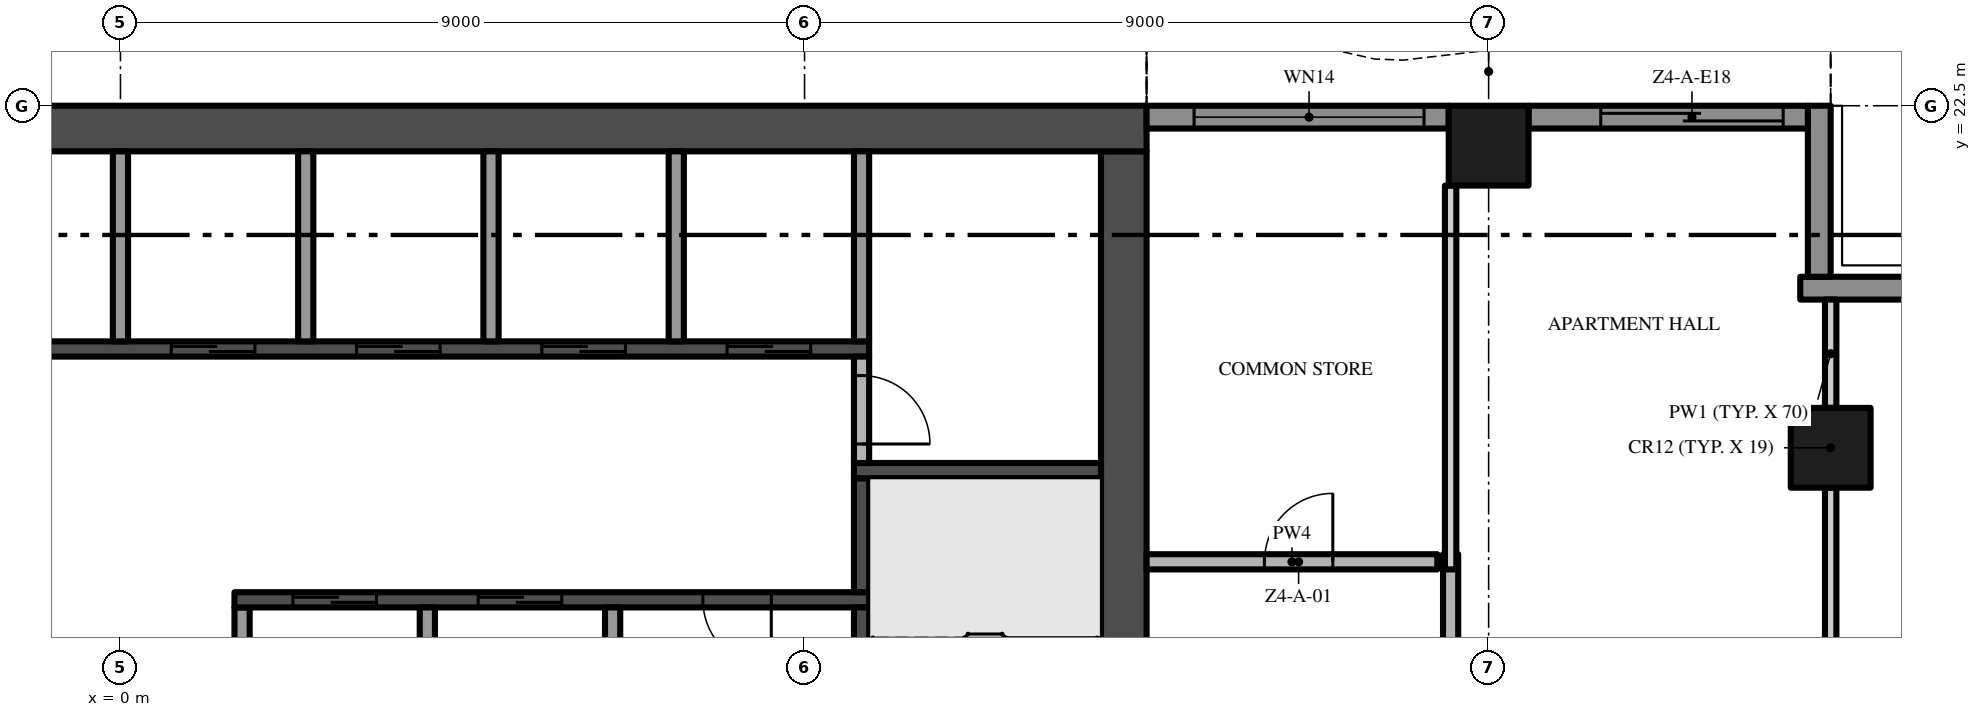
"""IFC4 building model, lengths in metres.
Left out: names, types, materials, properties, quantities, classifications, styles, units other than length and angle.
Written with IfcOpenShell. Run it as: python <this file> out.ifc"""

import sys

from ifc_helpers import new_model, si_unit, direction, frame, frame_2d, origin, origin_2d, place, context, subcontext, project, spatial, polyline, rectangle, outline, extrude, element, fill, save


model = new_model("IFC4")
c1 = context("Model", 3, precision=1e-05, world=origin(), true_north=direction((0.0, 1.0)))
c2 = subcontext(c1, "Body", "Model", "MODEL_VIEW")
j1 = project(units=[si_unit("LENGTHUNIT", "METRE"), si_unit("PLANEANGLEUNIT", "RADIAN")], contexts=[c1])
p1 = place(None, origin())
s1 = spatial("IfcSite", under=j1, at=p1, CompositionType="ELEMENT")
p2 = place(p1, origin())
s2 = spatial("IfcBuilding", under=s1, at=p2, CompositionType="ELEMENT")
p3 = place(p2, frame((0.0, 0.0, 192.0)))
s3 = spatial("IfcBuildingStorey", under=s2, at=p3, CompositionType="ELEMENT", Elevation=192.0)
p4 = place(p3, frame((13.2, 5.1, -0.3), z_axis=(0.0, 0.0, 1.0), x_axis=(0.0, 1.0, 0.0)))
e1 = element("IfcWall", 1, at=p4, inside=s3, PredefinedType="SHEAR", context=c2, shape_type="SweptSolid", body=[
    extrude(rectangle(XDim=16.8, YDim=0.6, at=frame_2d((8.4, 0.0))), origin(), (0.0, 0.0, 1.0), 3.8),
])
p5 = place(p4, frame((6.3, 0.0, 0.3)))
e2 = element("IfcOpeningElement", 2, at=p5, cuts=e1, PredefinedType="OPENING", context=c2, shape_type="SweptSolid", body=[
    extrude(rectangle(XDim=1.2, YDim=2.2, at=frame_2d((0.6, 1.1))), frame((0.0, 0.31, 0.0), z_axis=(0.0, -1.0, 0.0), x_axis=(1.0, 0.0, 0.0)), (0.0, 0.0, 1.0), 0.62),
])
p6 = place(p3, frame((13.5, 22.2, -0.3), z_axis=(0.0, 0.0, 1.0), x_axis=(-1.0, 0.0, 0.0)))
e3 = element("IfcWall", 3, at=p6, inside=s3, PredefinedType="SHEAR", context=c2, shape_type="SweptSolid", body=[
    extrude(rectangle(XDim=27.0, YDim=0.6, at=frame_2d((13.5, 0.0))), origin(), (0.0, 0.0, 1.0), 3.8),
])
for number, where, z_axis, x_axis in (
    (4, (18.0, 21.975, 0.0), (0.0, 0.0, 1.0), (1.0, 0.0, 0.0)),
    (5, (22.5, 18.0, 0.0), (0.0, 0.0, 1.0), (1.0, 0.0, 0.0)),
):
    element("IfcColumn", number, at=place(p3, frame(where, z_axis=z_axis, x_axis=x_axis)), inside=s3, PredefinedType="COLUMN", context=c2, shape_type="SweptSolid", body=[
        extrude(rectangle(XDim=1.05, YDim=1.05, at=origin_2d()), origin(), (0.0, 0.0, 1.0), 3.5),
    ])
p7 = place(p3, frame((22.1, 20.1, 0.0), z_axis=(0.0, 0.0, 1.0), x_axis=(1.0, 0.0, 0.0)))
e6 = element("IfcWall", 6, at=p7, inside=s3, PredefinedType="SOLIDWALL", context=c2, shape_type="SweptSolid", body=[
    extrude(rectangle(XDim=2.35, YDim=0.3, at=frame_2d((1.175, 0.0))), origin(), (0.0, 0.0, 1.0), 3.5),
])
p8 = place(p3, frame((22.35, 22.5, 0.0), z_axis=(0.0, 0.0, 1.0), x_axis=(0.0, -1.0, 0.0)))
e7 = element("IfcWall", 7, at=p8, inside=s3, PredefinedType="SOLIDWALL", context=c2, shape_type="SweptSolid", body=[
    extrude(rectangle(XDim=2.25, YDim=0.3, at=frame_2d((1.125, 0.0))), origin(), (0.0, 0.0, 1.0), 3.5),
])
p9 = place(p3, frame((18.525, 22.35, 0.0), z_axis=(0.0, 0.0, 1.0), x_axis=(1.0, 0.0, 0.0)))
e8 = element("IfcWall", 8, at=p9, inside=s3, PredefinedType="SOLIDWALL", context=c2, shape_type="SweptSolid", body=[
    extrude(rectangle(XDim=3.675, YDim=0.3, at=frame_2d((1.837, 0.0))), origin(), (0.0, 0.0, 1.0), 3.5),
])
p10 = place(p9, frame((0.95, 0.0, 0.0)))
e9 = element("IfcOpeningElement", 9, at=p10, cuts=e8, PredefinedType="OPENING", context=c2, shape_type="SweptSolid", body=[
    extrude(rectangle(XDim=2.4, YDim=2.4, at=frame_2d((1.2, 1.2))), frame((0.0, 0.16, 0.0), z_axis=(0.0, -1.0, 0.0), x_axis=(1.0, 0.0, 0.0)), (0.0, 0.0, 1.0), 0.32),
])
p11 = place(p3, frame((13.5, 22.35, 0.0), z_axis=(0.0, 0.0, 1.0), x_axis=(1.0, 0.0, 0.0)))
e10 = element("IfcWall", 10, at=p11, inside=s3, PredefinedType="SOLIDWALL", context=c2, shape_type="SweptSolid", body=[
    extrude(rectangle(XDim=3.975, YDim=0.3, at=frame_2d((1.988, 0.0))), origin(), (0.0, 0.0, 1.0), 3.5),
])
p12 = place(p11, frame((0.625, 0.0, 0.45)))
e11 = element("IfcOpeningElement", 11, at=p12, cuts=e10, PredefinedType="OPENING", context=c2, shape_type="SweptSolid", body=[
    extrude(rectangle(XDim=3.025, YDim=2.65, at=frame_2d((1.512, 1.325))), frame((0.0, 0.16, 0.0), z_axis=(0.0, -1.0, 0.0), x_axis=(1.0, 0.0, 0.0)), (0.0, 0.0, 1.0), 0.32),
])
p13 = place(p3, origin())
e12 = element("IfcWall", 12, at=p13, inside=s3, PredefinedType="USERDEFINED", context=c2, shape_type="SweptSolid", body=[
    extrude(outline(polyline([(22.5, 25.149), (21.0, 24.488), (19.5, 23.755), (18.0, 23.231), (16.875, 23.1), (16.5, 23.115), (15.0, 23.451), (13.5, 24.112), (13.399, 23.883), (14.921, 23.213), (16.467, 22.866), (16.885, 22.849), (18.056, 22.986), (19.596, 23.524), (21.105, 24.261), (22.601, 24.92), (22.5, 25.149)])), origin(), (0.0, 0.0, 1.0), 0.9),
])
p14 = place(p3, frame((-9.85, 19.3, 0.0), z_axis=(0.0, 0.0, 1.0), x_axis=(1.0, 0.0, 0.0)))
e13 = element("IfcWall", 13, at=p14, inside=s3, PredefinedType="SHEAR", context=c2, shape_type="SweptSolid", body=[
    extrude(rectangle(XDim=19.7, YDim=0.2, at=frame_2d((9.85, 0.0))), origin(), (0.0, 0.0, 1.0), 3.5),
])
p15 = place(p14, frame((10.519, 0.0, 0.0)))
e14 = element("IfcOpeningElement", 14, at=p15, cuts=e13, PredefinedType="OPENING", context=c2, shape_type="SweptSolid", body=[
    extrude(rectangle(XDim=1.1, YDim=2.1, at=frame_2d((0.55, 1.05))), frame((0.0, 0.11, 0.0), z_axis=(0.0, -1.0, 0.0), x_axis=(1.0, 0.0, 0.0)), (0.0, 0.0, 1.0), 0.22),
])
p16 = place(p14, frame((12.956, 0.0, 0.0)))
e15 = element("IfcOpeningElement", 15, at=p16, cuts=e13, PredefinedType="OPENING", context=c2, shape_type="SweptSolid", body=[
    extrude(rectangle(XDim=1.1, YDim=2.1, at=frame_2d((0.55, 1.05))), frame((0.0, 0.11, 0.0), z_axis=(0.0, -1.0, 0.0), x_axis=(1.0, 0.0, 0.0)), (0.0, 0.0, 1.0), 0.22),
])
p17 = place(p14, frame((15.394, 0.0, 0.0)))
e16 = element("IfcOpeningElement", 16, at=p17, cuts=e13, PredefinedType="OPENING", context=c2, shape_type="SweptSolid", body=[
    extrude(rectangle(XDim=1.1, YDim=2.1, at=frame_2d((0.55, 1.05))), frame((0.0, 0.11, 0.0), z_axis=(0.0, -1.0, 0.0), x_axis=(1.0, 0.0, 0.0)), (0.0, 0.0, 1.0), 0.22),
])
p18 = place(p14, frame((17.831, 0.0, 0.0)))
e17 = element("IfcOpeningElement", 17, at=p18, cuts=e13, PredefinedType="OPENING", context=c2, shape_type="SweptSolid", body=[
    extrude(rectangle(XDim=1.1, YDim=2.1, at=frame_2d((0.55, 1.05))), frame((0.0, 0.11, 0.0), z_axis=(0.0, -1.0, 0.0), x_axis=(1.0, 0.0, 0.0)), (0.0, 0.0, 1.0), 0.22),
])
p19 = place(p14, frame((2.087, 0.0, 0.0)))
e18 = element("IfcOpeningElement", 18, at=p19, cuts=e13, PredefinedType="OPENING", context=c2, shape_type="SweptSolid", body=[
    extrude(rectangle(XDim=0.9, YDim=2.1, at=frame_2d((0.45, 1.05))), frame((0.0, 0.11, 0.0), z_axis=(0.0, -1.0, 0.0), x_axis=(1.0, 0.0, 0.0)), (0.0, 0.0, 1.0), 0.22),
])
p20 = place(p14, frame((6.963, 0.0, 0.0)))
e19 = element("IfcOpeningElement", 19, at=p20, cuts=e13, PredefinedType="OPENING", context=c2, shape_type="SweptSolid", body=[
    extrude(rectangle(XDim=0.9, YDim=2.1, at=frame_2d((0.45, 1.05))), frame((0.0, 0.11, 0.0), z_axis=(0.0, -1.0, 0.0), x_axis=(1.0, 0.0, 0.0)), (0.0, 0.0, 1.0), 0.22),
])
p21 = place(p3, frame((0.0, 19.4, 0.0), z_axis=(0.0, 0.0, 1.0), x_axis=(0.0, 1.0, 0.0)))
e20 = element("IfcWall", 20, at=p21, inside=s3, PredefinedType="PARTITIONING", context=c2, shape_type="SweptSolid", body=[
    extrude(rectangle(XDim=2.5, YDim=0.2, at=frame_2d((1.25, 0.0))), origin(), (0.0, 0.0, 1.0), 3.5),
])
p22 = place(p3, frame((1.6, 13.7, 0.0), z_axis=(0.0, 0.0, 1.0), x_axis=(0.0, 1.0, 0.0)))
e21 = element("IfcWall", 21, at=p22, inside=s3, PredefinedType="PARTITIONING", context=c2, shape_type="SweptSolid", body=[
    extrude(rectangle(XDim=2.2, YDim=0.2, at=frame_2d((1.1, 0.0))), origin(), (0.0, 0.0, 1.0), 3.5),
])
p23 = place(p3, frame((9.85, 16.0, 0.0), z_axis=(0.0, 0.0, 1.0), x_axis=(-1.0, 0.0, 0.0)))
e22 = element("IfcWall", 22, at=p23, inside=s3, PredefinedType="SHEAR", context=c2, shape_type="SweptSolid", body=[
    extrude(rectangle(XDim=8.35, YDim=0.2, at=frame_2d((4.175, 0.0))), origin(), (0.0, 0.0, 1.0), 3.5),
])
p24 = place(p23, frame((6.481, 0.0, 0.0)))
e23 = element("IfcOpeningElement", 23, at=p24, cuts=e22, PredefinedType="OPENING", context=c2, shape_type="SweptSolid", body=[
    extrude(rectangle(XDim=1.1, YDim=2.1, at=frame_2d((0.55, 1.05))), frame((0.0, 0.11, 0.0), z_axis=(0.0, -1.0, 0.0), x_axis=(1.0, 0.0, 0.0)), (0.0, 0.0, 1.0), 0.22),
])
p25 = place(p23, frame((4.044, 0.0, 0.0)))
e24 = element("IfcOpeningElement", 24, at=p25, cuts=e22, PredefinedType="OPENING", context=c2, shape_type="SweptSolid", body=[
    extrude(rectangle(XDim=1.1, YDim=2.1, at=frame_2d((0.55, 1.05))), frame((0.0, 0.11, 0.0), z_axis=(0.0, -1.0, 0.0), x_axis=(1.0, 0.0, 0.0)), (0.0, 0.0, 1.0), 0.22),
])
p26 = place(p23, frame((1.288, 0.0, 0.0)))
e25 = element("IfcOpeningElement", 25, at=p26, cuts=e22, PredefinedType="OPENING", context=c2, shape_type="SweptSolid", body=[
    extrude(rectangle(XDim=0.9, YDim=2.1, at=frame_2d((0.45, 1.05))), frame((0.0, 0.11, 0.0), z_axis=(0.0, -1.0, 0.0), x_axis=(1.0, 0.0, 0.0)), (0.0, 0.0, 1.0), 0.22),
])
p27 = place(p3, frame((2.438, 19.4, 0.0), z_axis=(0.0, 0.0, 1.0), x_axis=(0.0, 1.0, 0.0)))
e26 = element("IfcWall", 26, at=p27, inside=s3, PredefinedType="PARTITIONING", context=c2, shape_type="SweptSolid", body=[
    extrude(rectangle(XDim=2.5, YDim=0.2, at=frame_2d((1.25, 0.0))), origin(), (0.0, 0.0, 1.0), 3.5),
])
p28 = place(p3, frame((4.037, 13.7, 0.0), z_axis=(0.0, 0.0, 1.0), x_axis=(0.0, 1.0, 0.0)))
e27 = element("IfcWall", 27, at=p28, inside=s3, PredefinedType="PARTITIONING", context=c2, shape_type="SweptSolid", body=[
    extrude(rectangle(XDim=2.2, YDim=0.2, at=frame_2d((1.1, 0.0))), origin(), (0.0, 0.0, 1.0), 3.5),
])
p29 = place(p3, frame((4.875, 19.4, 0.0), z_axis=(0.0, 0.0, 1.0), x_axis=(0.0, 1.0, 0.0)))
e28 = element("IfcWall", 28, at=p29, inside=s3, PredefinedType="PARTITIONING", context=c2, shape_type="SweptSolid", body=[
    extrude(rectangle(XDim=2.5, YDim=0.2, at=frame_2d((1.25, 0.0))), origin(), (0.0, 0.0, 1.0), 3.5),
])
p30 = place(p3, frame((6.475, 13.7, 0.0), z_axis=(0.0, 0.0, 1.0), x_axis=(0.0, 1.0, 0.0)))
e29 = element("IfcWall", 29, at=p30, inside=s3, PredefinedType="PARTITIONING", context=c2, shape_type="SweptSolid", body=[
    extrude(rectangle(XDim=2.2, YDim=0.2, at=frame_2d((1.1, 0.0))), origin(), (0.0, 0.0, 1.0), 3.5),
])
p31 = place(p3, frame((7.312, 19.4, 0.0), z_axis=(0.0, 0.0, 1.0), x_axis=(0.0, 1.0, 0.0)))
e30 = element("IfcWall", 30, at=p31, inside=s3, PredefinedType="PARTITIONING", context=c2, shape_type="SweptSolid", body=[
    extrude(rectangle(XDim=2.5, YDim=0.2, at=frame_2d((1.25, 0.0))), origin(), (0.0, 0.0, 1.0), 3.5),
])
p32 = place(p3, frame((9.75, 12.3, 0.0), z_axis=(0.0, 0.0, 1.0), x_axis=(0.0, 1.0, 0.0)))
e31 = element("IfcWall", 31, at=p32, inside=s3, PredefinedType="SHEAR", context=c2, shape_type="SweptSolid", body=[
    extrude(rectangle(XDim=3.6, YDim=0.2, at=frame_2d((1.8, 0.0))), origin(), (0.0, 0.0, 1.0), 3.5),
])
p33 = place(p3, frame((9.75, 16.1, 0.0), z_axis=(0.0, 0.0, 1.0), x_axis=(0.0, 1.0, 0.0)))
e32 = element("IfcWall", 32, at=p33, inside=s3, PredefinedType="SHEAR", context=c2, shape_type="SweptSolid", body=[
    extrude(rectangle(XDim=1.5, YDim=0.2, at=frame_2d((0.75, 0.0))), origin(), (0.0, 0.0, 1.0), 3.5),
])
p34 = place(p3, frame((9.65, 17.7, 0.0), z_axis=(0.0, 0.0, 1.0), x_axis=(1.0, 0.0, 0.0)))
e33 = element("IfcWall", 33, at=p34, inside=s3, PredefinedType="SHEAR", context=c2, shape_type="SweptSolid", body=[
    extrude(rectangle(XDim=3.25, YDim=0.2, at=frame_2d((1.625, 0.0))), origin(), (0.0, 0.0, 1.0), 3.5),
])
p35 = place(p3, frame((9.75, 19.2, 0.0), z_axis=(0.0, 0.0, 1.0), x_axis=(0.0, -1.0, 0.0)))
e34 = element("IfcWall", 34, at=p35, inside=s3, PredefinedType="PARTITIONING", context=c2, shape_type="SweptSolid", body=[
    extrude(rectangle(XDim=1.4, YDim=0.2, at=frame_2d((0.7, 0.0))), origin(), (0.0, 0.0, 1.0), 3.5),
])
p36 = place(p35, frame((0.25, 0.0, 0.0)))
e35 = element("IfcOpeningElement", 35, at=p36, cuts=e34, PredefinedType="OPENING", context=c2, shape_type="SweptSolid", body=[
    extrude(rectangle(XDim=0.9, YDim=2.1, at=frame_2d((0.45, 1.05))), frame((0.0, 0.11, 0.0), z_axis=(0.0, -1.0, 0.0), x_axis=(1.0, 0.0, 0.0)), (0.0, 0.0, 1.0), 0.22),
])
p37 = place(p3, frame((9.75, 19.4, 0.0), z_axis=(0.0, 0.0, 1.0), x_axis=(0.0, 1.0, 0.0)))
e36 = element("IfcWall", 36, at=p37, inside=s3, PredefinedType="PARTITIONING", context=c2, shape_type="SweptSolid", body=[
    extrude(rectangle(XDim=2.5, YDim=0.2, at=frame_2d((1.25, 0.0))), origin(), (0.0, 0.0, 1.0), 3.5),
])
p38 = place(p3, frame((13.5, 16.5, 0.0), z_axis=(0.0, 0.0, 1.0), x_axis=(1.0, 0.0, 0.0)))
e37 = element("IfcWall", 37, at=p38, inside=s3, PredefinedType="PARTITIONING", context=c2, shape_type="SweptSolid", body=[
    extrude(rectangle(XDim=3.825, YDim=0.2, at=frame_2d((1.913, 0.0))), origin(), (0.0, 0.0, 1.0), 3.5),
])
p39 = place(p38, frame((1.55, 0.0, 0.0)))
e38 = element("IfcOpeningElement", 38, at=p39, cuts=e37, PredefinedType="OPENING", context=c2, shape_type="SweptSolid", body=[
    extrude(rectangle(XDim=0.9, YDim=2.1, at=frame_2d((0.45, 1.05))), frame((0.0, 0.11, 0.0), z_axis=(0.0, -1.0, 0.0), x_axis=(1.0, 0.0, 0.0)), (0.0, 0.0, 1.0), 0.22),
])
p40 = place(p3, frame((17.5, 16.6, 0.0), z_axis=(0.0, 0.0, 1.0), x_axis=(0.0, -1.0, 0.0)))
e39 = element("IfcWall", 39, at=p40, inside=s3, PredefinedType="PARTITIONING", context=c2, shape_type="SweptSolid", body=[
    extrude(rectangle(XDim=2.525, YDim=0.2, at=frame_2d((1.262, 0.0))), origin(), (0.0, 0.0, 1.0), 3.5),
])
p41 = place(p40, frame((1.175, 0.0, 0.0)))
e40 = element("IfcOpeningElement", 40, at=p41, cuts=e39, PredefinedType="OPENING", context=c2, shape_type="SweptSolid", body=[
    extrude(rectangle(XDim=1.2, YDim=2.4, at=frame_2d((0.6, 1.2))), frame((0.0, 0.11, 0.0), z_axis=(0.0, -1.0, 0.0), x_axis=(1.0, 0.0, 0.0)), (0.0, 0.0, 1.0), 0.22),
])
p42 = place(p3, frame((17.5, 16.4, 0.0), z_axis=(0.0, 0.0, 1.0), x_axis=(0.0, 1.0, 0.0)))
e41 = element("IfcWall", 41, at=p42, inside=s3, PredefinedType="PARTITIONING", context=c2, shape_type="SweptSolid", body=[
    extrude(rectangle(XDim=5.05, YDim=0.15, at=frame_2d((2.525, 0.0))), origin(), (0.0, 0.0, 1.0), 3.5),
])
p43 = place(p3, frame((22.5, 17.475, 0.0), z_axis=(0.0, 0.0, 1.0), x_axis=(0.0, -1.0, 0.0)))
e42 = element("IfcWall", 42, at=p43, inside=s3, PredefinedType="PARTITIONING", context=c2, shape_type="SweptSolid", body=[
    extrude(rectangle(XDim=17.375, YDim=0.15, at=frame_2d((8.688, 0.0))), origin(), (0.0, 0.0, 1.0), 3.5),
])
p44 = place(p43, frame((14.725, 0.0, 0.0)))
e43 = element("IfcOpeningElement", 43, at=p44, cuts=e42, PredefinedType="OPENING", context=c2, shape_type="SweptSolid", body=[
    extrude(rectangle(XDim=1.0, YDim=2.4, at=frame_2d((0.5, 1.2))), frame((0.0, 0.085, 0.0), z_axis=(0.0, -1.0, 0.0), x_axis=(1.0, 0.0, 0.0)), (0.0, 0.0, 1.0), 0.17),
])
p45 = place(p43, frame((9.125, 0.0, 0.0)))
e44 = element("IfcOpeningElement", 44, at=p45, cuts=e42, PredefinedType="OPENING", context=c2, shape_type="SweptSolid", body=[
    extrude(rectangle(XDim=1.0, YDim=2.4, at=frame_2d((0.5, 1.2))), frame((0.0, 0.085, 0.0), z_axis=(0.0, -1.0, 0.0), x_axis=(1.0, 0.0, 0.0)), (0.0, 0.0, 1.0), 0.17),
])
p46 = place(p43, frame((2.325, 0.0, 0.0)))
e45 = element("IfcOpeningElement", 45, at=p46, cuts=e42, PredefinedType="OPENING", context=c2, shape_type="SweptSolid", body=[
    extrude(rectangle(XDim=1.8, YDim=2.4, at=frame_2d((0.9, 1.2))), frame((0.0, 0.085, 0.0), z_axis=(0.0, -1.0, 0.0), x_axis=(1.0, 0.0, 0.0)), (0.0, 0.0, 1.0), 0.17),
])
p47 = place(p3, frame((22.5, 18.525, 0.0), z_axis=(0.0, 0.0, 1.0), x_axis=(0.0, 1.0, 0.0)))
e46 = element("IfcWall", 46, at=p47, inside=s3, PredefinedType="PARTITIONING", context=c2, shape_type="SweptSolid", body=[
    extrude(rectangle(XDim=1.425, YDim=0.15, at=frame_2d((0.713, 0.0))), origin(), (0.0, 0.0, 1.0), 3.5),
])
p48 = place(p10, origin())
e47 = element("IfcDoor", 47, at=p48, inside=s3, OperationType="SINGLE_SWING_LEFT", PredefinedType="DOOR", context=c2, shape_type="SweptSolid", body=[
    extrude(rectangle(XDim=2.4, YDim=2.4, at=frame_2d((1.2, 1.2))), frame((0.0, 0.025, 0.0), z_axis=(0.0, -1.0, 0.0), x_axis=(1.0, 0.0, 0.0)), (0.0, 0.0, 1.0), 0.05),
])
fill(e9, e47)
p49 = place(p12, origin())
e48 = element("IfcWindow", 48, at=p49, inside=s3, PartitioningType="SINGLE_PANEL", PredefinedType="WINDOW", context=c2, shape_type="SweptSolid", body=[
    extrude(rectangle(XDim=3.025, YDim=2.65, at=frame_2d((1.512, 1.325))), frame((0.0, 0.03, 0.0), z_axis=(0.0, -1.0, 0.0), x_axis=(1.0, 0.0, 0.0)), (0.0, 0.0, 1.0), 0.06),
])
fill(e11, e48)
p50 = place(p15, origin())
e49 = element("IfcDoor", 49, at=p50, inside=s3, OperationType="SLIDING_TO_RIGHT", PredefinedType="DOOR", context=c2, shape_type="SweptSolid", body=[
    extrude(rectangle(XDim=1.1, YDim=2.1, at=frame_2d((0.55, 1.05))), frame((0.0, 0.025, 0.0), z_axis=(0.0, -1.0, 0.0), x_axis=(1.0, 0.0, 0.0)), (0.0, 0.0, 1.0), 0.05),
])
fill(e14, e49)
p51 = place(p16, origin())
e50 = element("IfcDoor", 50, at=p51, inside=s3, OperationType="SLIDING_TO_RIGHT", PredefinedType="DOOR", context=c2, shape_type="SweptSolid", body=[
    extrude(rectangle(XDim=1.1, YDim=2.1, at=frame_2d((0.55, 1.05))), frame((0.0, 0.025, 0.0), z_axis=(0.0, -1.0, 0.0), x_axis=(1.0, 0.0, 0.0)), (0.0, 0.0, 1.0), 0.05),
])
fill(e15, e50)
p52 = place(p17, origin())
e51 = element("IfcDoor", 51, at=p52, inside=s3, OperationType="SLIDING_TO_RIGHT", PredefinedType="DOOR", context=c2, shape_type="SweptSolid", body=[
    extrude(rectangle(XDim=1.1, YDim=2.1, at=frame_2d((0.55, 1.05))), frame((0.0, 0.025, 0.0), z_axis=(0.0, -1.0, 0.0), x_axis=(1.0, 0.0, 0.0)), (0.0, 0.0, 1.0), 0.05),
])
fill(e16, e51)
p53 = place(p18, origin())
e52 = element("IfcDoor", 52, at=p53, inside=s3, OperationType="SLIDING_TO_RIGHT", PredefinedType="DOOR", context=c2, shape_type="SweptSolid", body=[
    extrude(rectangle(XDim=1.1, YDim=2.1, at=frame_2d((0.55, 1.05))), frame((0.0, 0.025, 0.0), z_axis=(0.0, -1.0, 0.0), x_axis=(1.0, 0.0, 0.0)), (0.0, 0.0, 1.0), 0.05),
])
fill(e17, e52)
p54 = place(p24, origin())
e53 = element("IfcDoor", 53, at=p54, inside=s3, OperationType="SLIDING_TO_RIGHT", PredefinedType="DOOR", context=c2, shape_type="SweptSolid", body=[
    extrude(rectangle(XDim=1.1, YDim=2.1, at=frame_2d((0.55, 1.05))), frame((0.0, 0.025, 0.0), z_axis=(0.0, -1.0, 0.0), x_axis=(1.0, 0.0, 0.0)), (0.0, 0.0, 1.0), 0.05),
])
fill(e23, e53)
p55 = place(p25, origin())
e54 = element("IfcDoor", 54, at=p55, inside=s3, OperationType="SLIDING_TO_RIGHT", PredefinedType="DOOR", context=c2, shape_type="SweptSolid", body=[
    extrude(rectangle(XDim=1.1, YDim=2.1, at=frame_2d((0.55, 1.05))), frame((0.0, 0.025, 0.0), z_axis=(0.0, -1.0, 0.0), x_axis=(1.0, 0.0, 0.0)), (0.0, 0.0, 1.0), 0.05),
])
fill(e24, e54)
p56 = place(p26, origin())
e55 = element("IfcDoor", 55, at=p56, inside=s3, OperationType="SINGLE_SWING_LEFT", PredefinedType="DOOR", context=c2, shape_type="SweptSolid", body=[
    extrude(rectangle(XDim=0.9, YDim=2.1, at=frame_2d((0.45, 1.05))), frame((0.0, 0.025, 0.0), z_axis=(0.0, -1.0, 0.0), x_axis=(1.0, 0.0, 0.0)), (0.0, 0.0, 1.0), 0.05),
])
fill(e25, e55)
p57 = place(p36, origin())
e56 = element("IfcDoor", 56, at=p57, inside=s3, OperationType="SINGLE_SWING_RIGHT", PredefinedType="DOOR", context=c2, shape_type="SweptSolid", body=[
    extrude(rectangle(XDim=0.9, YDim=2.1, at=frame_2d((0.45, 1.05))), frame((0.0, 0.025, 0.0), z_axis=(0.0, -1.0, 0.0), x_axis=(1.0, 0.0, 0.0)), (0.0, 0.0, 1.0), 0.05),
])
fill(e35, e56)
p58 = place(p39, origin())
e57 = element("IfcDoor", 57, at=p58, inside=s3, OperationType="SINGLE_SWING_RIGHT", PredefinedType="DOOR", context=c2, shape_type="SweptSolid", body=[
    extrude(rectangle(XDim=0.9, YDim=2.1, at=frame_2d((0.45, 1.05))), frame((0.0, 0.025, 0.0), z_axis=(0.0, -1.0, 0.0), x_axis=(1.0, 0.0, 0.0)), (0.0, 0.0, 1.0), 0.05),
])
fill(e38, e57)
save(model, sys.argv[1])
